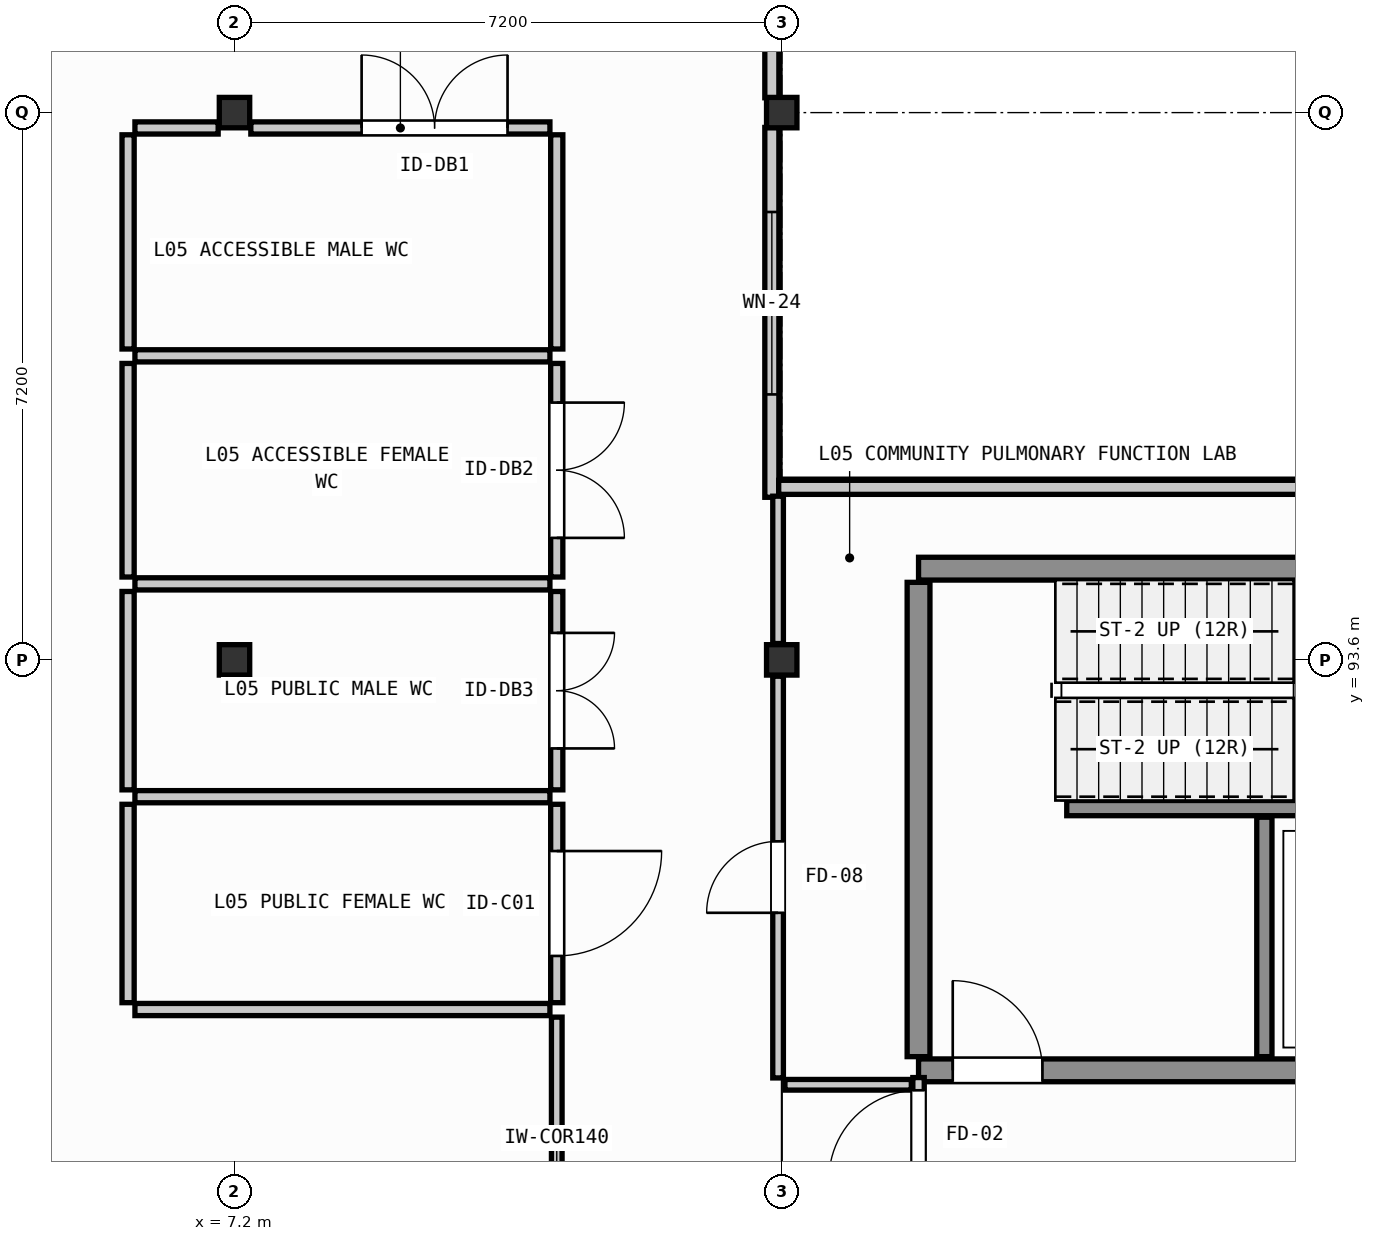
"""IFC4 building model, lengths in metres.
Left out: names, types, materials, properties, quantities, classifications, styles, units other than length and angle.
Written with IfcOpenShell. Run it as: python <this file> out.ifc"""

import sys

from ifc_helpers import new_model, si_unit, direction, frame, frame_2d, origin, origin_2d, place, context, subcontext, project, spatial, rectangle, extrude, element, fill, save


model = new_model("IFC4")
c1 = context("Model", 3, precision=1e-05, world=origin(), true_north=direction((0.0, 1.0)))
c2 = subcontext(c1, "Body", "Model", "MODEL_VIEW")
j1 = project(units=[si_unit("LENGTHUNIT", "METRE"), si_unit("PLANEANGLEUNIT", "RADIAN")], contexts=[c1])
p1 = place(None, origin())
s1 = spatial("IfcSite", under=j1, at=p1, CompositionType="ELEMENT")
p2 = place(p1, origin())
s2 = spatial("IfcBuilding", under=s1, at=p2, CompositionType="ELEMENT")
p3 = place(p2, frame((0.0, 0.0, 17.7)))
s3 = spatial("IfcBuildingStorey", under=s2, at=p3, CompositionType="ELEMENT", Elevation=17.7)
for number, where, z_axis, x_axis in (
    (1, (7.2, 93.6, 0.0), (0.0, 0.0, 1.0), (1.0, 0.0, 0.0)),
    (2, (7.2, 100.8, 0.0), (0.0, 0.0, 1.0), (1.0, 0.0, 0.0)),
    (3, (14.4, 93.6, 0.0), (0.0, 0.0, 1.0), (1.0, 0.0, 0.0)),
    (4, (14.4, 100.8, 0.0), (0.0, 0.0, 1.0), (1.0, 0.0, 0.0)),
):
    element("IfcColumn", number, at=place(p3, frame(where, z_axis=z_axis, x_axis=x_axis)), inside=s3, PredefinedType="COLUMN", context=c2, shape_type="SweptSolid", body=[
        extrude(rectangle(XDim=0.4, YDim=0.4, at=origin_2d()), origin(), (0.0, 0.0, 1.0), 3.69),
    ])
p4 = place(p3, frame((14.27, 105.861, 0.0), z_axis=(0.0, 0.0, 1.0), x_axis=(0.0, -1.0, 0.0)))
e5 = element("IfcWall", 5, at=p4, inside=s3, PredefinedType="SOLIDWALL", context=c2, shape_type="SweptSolid", body=[
    extrude(rectangle(XDim=4.866, YDim=0.185, at=frame_2d((2.433, 0.0))), origin(), (0.0, 0.0, 1.0), 3.05),
])
p5 = place(p4, frame((2.729, 0.0, 0.95)))
e6 = element("IfcOpeningElement", 6, at=p5, cuts=e5, PredefinedType="OPENING", context=c2, shape_type="SweptSolid", body=[
    extrude(rectangle(XDim=0.75, YDim=1.25, at=frame_2d((0.375, 0.625))), frame((0.0, 0.103, 0.0), z_axis=(0.0, -1.0, 0.0), x_axis=(1.0, 0.0, 0.0)), (0.0, 0.0, 1.0), 0.205),
])
p6 = place(p3, frame((14.27, 100.605, 0.0), z_axis=(0.0, 0.0, 1.0), x_axis=(0.0, -1.0, 0.0)))
e7 = element("IfcWall", 7, at=p6, inside=s3, PredefinedType="SOLIDWALL", context=c2, shape_type="SweptSolid", body=[
    extrude(rectangle(XDim=4.866, YDim=0.185, at=frame_2d((2.433, 0.0))), origin(), (0.0, 0.0, 1.0), 3.05),
])
p7 = place(p6, frame((1.113, 0.0, 1.5)))
e8 = element("IfcOpeningElement", 8, at=p7, cuts=e7, PredefinedType="OPENING", context=c2, shape_type="SweptSolid", body=[
    extrude(rectangle(XDim=2.4, YDim=0.95, at=frame_2d((1.2, 0.475))), frame((0.0, 0.103, 0.0), z_axis=(0.0, -1.0, 0.0), x_axis=(1.0, 0.0, 0.0)), (0.0, 0.0, 1.0), 0.205),
])
p8 = place(p3, frame((14.36, 95.87, 0.0), z_axis=(0.0, 0.0, 1.0), x_axis=(1.0, 0.0, 0.0)))
e9 = element("IfcWall", 9, at=p8, inside=s3, PredefinedType="SOLIDWALL", context=c2, shape_type="SweptSolid", body=[
    extrude(rectangle(XDim=7.24, YDim=0.185, at=frame_2d((3.62, 0.0))), origin(), (0.0, 0.0, 1.0), 3.13),
])
p9 = place(p3, frame((16.2, 88.2, 0.0), z_axis=(0.0, 0.0, 1.0), x_axis=(1.0, 0.0, 0.0)))
e10 = element("IfcWall", 10, at=p9, inside=s3, PredefinedType="SHEAR", context=c2, shape_type="SweptSolid", body=[
    extrude(rectangle(XDim=10.8, YDim=0.3, at=frame_2d((5.4, 0.0))), origin(), (0.0, 0.0, 1.0), 3.9),
])
p10 = place(p9, frame((0.45, 0.0, 0.0)))
e11 = element("IfcOpeningElement", 11, at=p10, cuts=e10, PredefinedType="OPENING", context=c2, shape_type="SweptSolid", body=[
    extrude(rectangle(XDim=1.18, YDim=2.16, at=frame_2d((0.59, 1.08))), frame((0.0, 0.16, 0.0), z_axis=(0.0, -1.0, 0.0), x_axis=(1.0, 0.0, 0.0)), (0.0, 0.0, 1.0), 0.32),
])
p11 = place(p9, frame((5.375, 0.0, 0.0)))
e12 = element("IfcOpeningElement", 12, at=p11, cuts=e10, PredefinedType="OPENING", context=c2, shape_type="SweptSolid", body=[
    extrude(rectangle(XDim=1.15, YDim=2.15, at=frame_2d((0.575, 1.075))), frame((0.0, 0.16, 0.0), z_axis=(0.0, -1.0, 0.0), x_axis=(1.0, 0.0, 0.0)), (0.0, 0.0, 1.0), 0.32),
])
p12 = place(p9, frame((8.34, 0.0, 0.0)))
e13 = element("IfcOpeningElement", 13, at=p12, cuts=e10, PredefinedType="OPENING", context=c2, shape_type="SweptSolid", body=[
    extrude(rectangle(XDim=1.02, YDim=2.12, at=frame_2d((0.51, 1.06))), frame((0.0, 0.16, 0.0), z_axis=(0.0, -1.0, 0.0), x_axis=(1.0, 0.0, 0.0)), (0.0, 0.0, 1.0), 0.32),
])
p13 = place(p3, frame((16.2, 94.8, 0.0), z_axis=(0.0, 0.0, 1.0), x_axis=(1.0, 0.0, 0.0)))
e14 = element("IfcWall", 14, at=p13, inside=s3, PredefinedType="SHEAR", context=c2, shape_type="SweptSolid", body=[
    extrude(rectangle(XDim=10.8, YDim=0.3, at=frame_2d((5.4, 0.0))), origin(), (0.0, 0.0, 1.0), 3.9),
])
p14 = place(p3, frame((16.2, 88.38, 0.0), z_axis=(0.0, 0.0, 1.0), x_axis=(0.0, 1.0, 0.0)))
e15 = element("IfcWall", 15, at=p14, inside=s3, PredefinedType="SHEAR", context=c2, shape_type="SweptSolid", body=[
    extrude(rectangle(XDim=6.24, YDim=0.3, at=frame_2d((3.12, 0.0))), origin(), (0.0, 0.0, 1.0), 3.9),
])
p15 = place(p3, frame((18.15, 91.65, 0.0), z_axis=(0.0, 0.0, 1.0), x_axis=(1.0, 0.0, 0.0)))
e16 = element("IfcWall", 16, at=p15, inside=s3, PredefinedType="SHEAR", context=c2, shape_type="SweptSolid", body=[
    extrude(rectangle(XDim=8.67, YDim=0.2, at=frame_2d((4.335, 0.0))), origin(), (0.0, 0.0, 1.0), 3.9),
])
p16 = place(p3, frame((20.75, 88.38, 0.0), z_axis=(0.0, 0.0, 1.0), x_axis=(0.0, 1.0, 0.0)))
e17 = element("IfcWall", 17, at=p16, inside=s3, PredefinedType="SHEAR", context=c2, shape_type="SweptSolid", body=[
    extrude(rectangle(XDim=3.15, YDim=0.2, at=frame_2d((1.575, 0.0))), origin(), (0.0, 0.0, 1.0), 3.9),
])
p17 = place(p3, frame((16.2, 85.69, 0.0), z_axis=(0.0, 0.0, 1.0), x_axis=(0.0, 1.0, 0.0)))
e18 = element("IfcWall", 18, at=p17, inside=s3, PredefinedType="PARTITIONING", context=c2, shape_type="SweptSolid", body=[
    extrude(rectangle(XDim=2.415, YDim=0.15, at=frame_2d((1.208, 0.0))), origin(), (0.0, 0.0, 1.0), 3.05),
])
p18 = place(p17, frame((1.067, 0.0, 0.0)))
e19 = element("IfcOpeningElement", 19, at=p18, cuts=e18, PredefinedType="OPENING", context=c2, shape_type="SweptSolid", body=[
    extrude(rectangle(XDim=1.18, YDim=2.16, at=frame_2d((0.59, 1.08))), frame((0.0, 0.085, 0.0), z_axis=(0.0, -1.0, 0.0), x_axis=(1.0, 0.0, 0.0)), (0.0, 0.0, 1.0), 0.17),
])
p19 = place(p3, frame((5.89, 100.598, 0.0), z_axis=(0.0, 0.0, 1.0), x_axis=(1.0, 0.0, 0.0)))
e20 = element("IfcWall", 20, at=p19, inside=s3, PredefinedType="PLUMBINGWALL", context=c2, shape_type="SweptSolid", body=[
    extrude(rectangle(XDim=1.095, YDim=0.16, at=frame_2d((0.548, 0.0))), origin(), (0.0, 0.0, 1.0), 3.05),
])
p20 = place(p3, frame((7.415, 100.598, 0.0), z_axis=(0.0, 0.0, 1.0), x_axis=(1.0, 0.0, 0.0)))
e21 = element("IfcWall", 21, at=p20, inside=s3, PredefinedType="PLUMBINGWALL", context=c2, shape_type="SweptSolid", body=[
    extrude(rectangle(XDim=3.935, YDim=0.16, at=frame_2d((1.968, 0.0))), origin(), (0.0, 0.0, 1.0), 3.05),
])
p21 = place(p20, frame((1.458, 0.0, 0.0)))
e22 = element("IfcOpeningElement", 22, at=p21, cuts=e21, PredefinedType="OPENING", context=c2, shape_type="SweptSolid", body=[
    extrude(rectangle(XDim=1.92, YDim=2.36, at=frame_2d((0.96, 1.18))), frame((0.0, 0.09, 0.0), z_axis=(0.0, -1.0, 0.0), x_axis=(1.0, 0.0, 0.0)), (0.0, 0.0, 1.0), 0.18),
])
p22 = place(p3, frame((11.44, 100.508, 0.0), z_axis=(0.0, 0.0, 1.0), x_axis=(0.0, -1.0, 0.0)))
e23 = element("IfcWall", 23, at=p22, inside=s3, PredefinedType="PLUMBINGWALL", context=c2, shape_type="SweptSolid", body=[
    extrude(rectangle(XDim=2.818, YDim=0.16, at=frame_2d((1.409, 0.0))), origin(), (0.0, 0.0, 1.0), 3.05),
])
p23 = place(p3, frame((11.35, 97.6, 0.0), z_axis=(0.0, 0.0, 1.0), x_axis=(-1.0, 0.0, 0.0)))
e24 = element("IfcWall", 24, at=p23, inside=s3, PredefinedType="PLUMBINGWALL", context=c2, shape_type="SweptSolid", body=[
    extrude(rectangle(XDim=5.46, YDim=0.16, at=frame_2d((2.73, 0.0))), origin(), (0.0, 0.0, 1.0), 3.13),
])
p24 = place(p3, frame((5.8, 97.69, 0.0), z_axis=(0.0, 0.0, 1.0), x_axis=(0.0, 1.0, 0.0)))
e25 = element("IfcWall", 25, at=p24, inside=s3, PredefinedType="PLUMBINGWALL", context=c2, shape_type="SweptSolid", body=[
    extrude(rectangle(XDim=2.818, YDim=0.16, at=frame_2d((1.409, 0.0))), origin(), (0.0, 0.0, 1.0), 3.05),
])
p25 = place(p3, frame((11.44, 97.5, 0.0), z_axis=(0.0, 0.0, 1.0), x_axis=(0.0, -1.0, 0.0)))
e26 = element("IfcWall", 26, at=p25, inside=s3, PredefinedType="PLUMBINGWALL", context=c2, shape_type="SweptSolid", body=[
    extrude(rectangle(XDim=2.81, YDim=0.16, at=frame_2d((1.405, 0.0))), origin(), (0.0, 0.0, 1.0), 3.67),
])
p26 = place(p25, frame((0.515, 0.0, 0.0)))
e27 = element("IfcOpeningElement", 27, at=p26, cuts=e26, PredefinedType="OPENING", context=c2, shape_type="SweptSolid", body=[
    extrude(rectangle(XDim=1.78, YDim=2.32, at=frame_2d((0.89, 1.16))), frame((0.0, 0.09, 0.0), z_axis=(0.0, -1.0, 0.0), x_axis=(1.0, 0.0, 0.0)), (0.0, 0.0, 1.0), 0.18),
])
p27 = place(p3, frame((11.35, 94.6, 0.0), z_axis=(0.0, 0.0, 1.0), x_axis=(-1.0, 0.0, 0.0)))
e28 = element("IfcWall", 28, at=p27, inside=s3, PredefinedType="PLUMBINGWALL", context=c2, shape_type="SweptSolid", body=[
    extrude(rectangle(XDim=5.46, YDim=0.16, at=frame_2d((2.73, 0.0))), origin(), (0.0, 0.0, 1.0), 3.13),
])
p28 = place(p3, frame((5.8, 94.69, 0.0), z_axis=(0.0, 0.0, 1.0), x_axis=(0.0, 1.0, 0.0)))
e29 = element("IfcWall", 29, at=p28, inside=s3, PredefinedType="PLUMBINGWALL", context=c2, shape_type="SweptSolid", body=[
    extrude(rectangle(XDim=2.81, YDim=0.16, at=frame_2d((1.405, 0.0))), origin(), (0.0, 0.0, 1.0), 3.67),
])
p29 = place(p3, frame((11.44, 94.5, 0.0), z_axis=(0.0, 0.0, 1.0), x_axis=(0.0, -1.0, 0.0)))
e30 = element("IfcWall", 30, at=p29, inside=s3, PredefinedType="PLUMBINGWALL", context=c2, shape_type="SweptSolid", body=[
    extrude(rectangle(XDim=2.61, YDim=0.16, at=frame_2d((1.305, 0.0))), origin(), (0.0, 0.0, 1.0), 3.05),
])
p30 = place(p29, frame((0.545, 0.0, 0.0)))
e31 = element("IfcOpeningElement", 31, at=p30, cuts=e30, PredefinedType="OPENING", context=c2, shape_type="SweptSolid", body=[
    extrude(rectangle(XDim=1.52, YDim=2.26, at=frame_2d((0.76, 1.13))), frame((0.0, 0.09, 0.0), z_axis=(0.0, -1.0, 0.0), x_axis=(1.0, 0.0, 0.0)), (0.0, 0.0, 1.0), 0.18),
])
p31 = place(p3, frame((11.35, 91.8, 0.0), z_axis=(0.0, 0.0, 1.0), x_axis=(-1.0, 0.0, 0.0)))
e32 = element("IfcWall", 32, at=p31, inside=s3, PredefinedType="PLUMBINGWALL", context=c2, shape_type="SweptSolid", body=[
    extrude(rectangle(XDim=5.46, YDim=0.16, at=frame_2d((2.73, 0.0))), origin(), (0.0, 0.0, 1.0), 3.13),
])
p32 = place(p3, frame((5.8, 91.89, 0.0), z_axis=(0.0, 0.0, 1.0), x_axis=(0.0, 1.0, 0.0)))
e33 = element("IfcWall", 33, at=p32, inside=s3, PredefinedType="PLUMBINGWALL", context=c2, shape_type="SweptSolid", body=[
    extrude(rectangle(XDim=2.61, YDim=0.16, at=frame_2d((1.305, 0.0))), origin(), (0.0, 0.0, 1.0), 3.05),
])
p33 = place(p3, frame((11.44, 91.7, 0.0), z_axis=(0.0, 0.0, 1.0), x_axis=(0.0, -1.0, 0.0)))
e34 = element("IfcWall", 34, at=p33, inside=s3, PredefinedType="PLUMBINGWALL", context=c2, shape_type="SweptSolid", body=[
    extrude(rectangle(XDim=2.61, YDim=0.16, at=frame_2d((1.305, 0.0))), origin(), (0.0, 0.0, 1.0), 3.67),
])
p34 = place(p33, frame((0.615, 0.0, 0.0)))
e35 = element("IfcOpeningElement", 35, at=p34, cuts=e34, PredefinedType="OPENING", context=c2, shape_type="SweptSolid", body=[
    extrude(rectangle(XDim=1.38, YDim=2.32, at=frame_2d((0.69, 1.16))), frame((0.0, 0.09, 0.0), z_axis=(0.0, -1.0, 0.0), x_axis=(1.0, 0.0, 0.0)), (0.0, 0.0, 1.0), 0.18),
])
p35 = place(p3, frame((11.35, 89.0, 0.0), z_axis=(0.0, 0.0, 1.0), x_axis=(-1.0, 0.0, 0.0)))
e36 = element("IfcWall", 36, at=p35, inside=s3, PredefinedType="PLUMBINGWALL", context=c2, shape_type="SweptSolid", body=[
    extrude(rectangle(XDim=5.46, YDim=0.16, at=frame_2d((2.73, 0.0))), origin(), (0.0, 0.0, 1.0), 3.13),
])
p36 = place(p3, frame((5.8, 89.09, 0.0), z_axis=(0.0, 0.0, 1.0), x_axis=(0.0, 1.0, 0.0)))
e37 = element("IfcWall", 37, at=p36, inside=s3, PredefinedType="PLUMBINGWALL", context=c2, shape_type="SweptSolid", body=[
    extrude(rectangle(XDim=2.61, YDim=0.16, at=frame_2d((1.305, 0.0))), origin(), (0.0, 0.0, 1.0), 3.67),
])
p37 = place(p3, frame((11.44, 88.9, 0.0), z_axis=(0.0, 0.0, 1.0), x_axis=(0.0, -1.0, 0.0)))
e38 = element("IfcWall", 38, at=p37, inside=s3, PredefinedType="PARTITIONING", context=c2, shape_type="SweptSolid", body=[
    extrude(rectangle(XDim=5.867, YDim=0.14, at=frame_2d((2.934, 0.0))), origin(), (0.0, 0.0, 1.0), 3.05),
])
p38 = place(p37, frame((2.154, 0.0, 0.0)))
e39 = element("IfcOpeningElement", 39, at=p38, cuts=e38, PredefinedType="OPENING", context=c2, shape_type="SweptSolid", body=[
    extrude(rectangle(XDim=1.56, YDim=2.22, at=frame_2d((0.78, 1.11))), frame((0.0, 0.08, 0.0), z_axis=(0.0, -1.0, 0.0), x_axis=(1.0, 0.0, 0.0)), (0.0, 0.0, 1.0), 0.16),
])
p39 = place(p3, frame((14.352, 88.1, 0.0), z_axis=(0.0, 0.0, 1.0), x_axis=(0.0, 1.0, 0.0)))
e40 = element("IfcWall", 40, at=p39, inside=s3, PredefinedType="PARTITIONING", context=c2, shape_type="SweptSolid", body=[
    extrude(rectangle(XDim=5.285, YDim=0.14, at=frame_2d((2.643, 0.0))), origin(), (0.0, 0.0, 1.0), 3.05),
])
p40 = place(p39, frame((2.173, 0.0, 0.0)))
e41 = element("IfcOpeningElement", 41, at=p40, cuts=e40, PredefinedType="OPENING", context=c2, shape_type="SweptSolid", body=[
    extrude(rectangle(XDim=0.94, YDim=2.1, at=frame_2d((0.47, 1.05))), frame((0.0, 0.08, 0.0), z_axis=(0.0, -1.0, 0.0), x_axis=(1.0, 0.0, 0.0)), (0.0, 0.0, 1.0), 0.16),
])
p41 = place(p3, frame((14.352, 93.815, 0.0), z_axis=(0.0, 0.0, 1.0), x_axis=(0.0, 1.0, 0.0)))
e42 = element("IfcWall", 42, at=p41, inside=s3, PredefinedType="PARTITIONING", context=c2, shape_type="SweptSolid", body=[
    extrude(rectangle(XDim=1.939, YDim=0.14, at=frame_2d((0.969, 0.0))), origin(), (0.0, 0.0, 1.0), 3.05),
])
p42 = place(p3, frame((16.105, 88.01, 0.0), z_axis=(0.0, 0.0, 1.0), x_axis=(-1.0, 0.0, 0.0)))
e43 = element("IfcWall", 43, at=p42, inside=s3, PredefinedType="PARTITIONING", context=c2, shape_type="SweptSolid", body=[
    extrude(rectangle(XDim=1.663, YDim=0.14, at=frame_2d((0.832, 0.0))), origin(), (0.0, 0.0, 1.0), 3.13),
])
p43 = place(p7, origin())
e44 = element("IfcWindow", 44, at=p43, inside=s3, PartitioningType="SINGLE_PANEL", PredefinedType="WINDOW", context=c2, shape_type="SweptSolid", body=[
    extrude(rectangle(XDim=2.4, YDim=0.95, at=frame_2d((1.2, 0.475))), frame((0.0, 0.03, 0.0), z_axis=(0.0, -1.0, 0.0), x_axis=(1.0, 0.0, 0.0)), (0.0, 0.0, 1.0), 0.06),
])
fill(e8, e44)
p44 = place(p10, origin())
e45 = element("IfcDoor", 45, at=p44, inside=s3, OperationType="SINGLE_SWING_LEFT", PredefinedType="DOOR", context=c2, shape_type="SweptSolid", body=[
    extrude(rectangle(XDim=1.18, YDim=2.16, at=frame_2d((0.59, 1.08))), frame((0.0, 0.025, 0.0), z_axis=(0.0, -1.0, 0.0), x_axis=(1.0, 0.0, 0.0)), (0.0, 0.0, 1.0), 0.05),
])
fill(e11, e45)
p45 = place(p18, origin())
e46 = element("IfcDoor", 46, at=p45, inside=s3, OperationType="SINGLE_SWING_RIGHT", PredefinedType="DOOR", context=c2, shape_type="SweptSolid", body=[
    extrude(rectangle(XDim=1.18, YDim=2.16, at=frame_2d((0.59, 1.08))), frame((0.0, 0.025, 0.0), z_axis=(0.0, -1.0, 0.0), x_axis=(1.0, 0.0, 0.0)), (0.0, 0.0, 1.0), 0.05),
])
fill(e19, e46)
p46 = place(p21, origin())
e47 = element("IfcDoor", 47, at=p46, inside=s3, OperationType="DOUBLE_DOOR_SINGLE_SWING", PredefinedType="DOOR", context=c2, shape_type="SweptSolid", body=[
    extrude(rectangle(XDim=1.92, YDim=2.36, at=frame_2d((0.96, 1.18))), frame((0.0, 0.025, 0.0), z_axis=(0.0, -1.0, 0.0), x_axis=(1.0, 0.0, 0.0)), (0.0, 0.0, 1.0), 0.05),
])
fill(e22, e47)
p47 = place(p26, origin())
e48 = element("IfcDoor", 48, at=p47, inside=s3, OperationType="DOUBLE_DOOR_SINGLE_SWING", PredefinedType="DOOR", context=c2, shape_type="SweptSolid", body=[
    extrude(rectangle(XDim=1.78, YDim=2.32, at=frame_2d((0.89, 1.16))), frame((0.0, 0.025, 0.0), z_axis=(0.0, -1.0, 0.0), x_axis=(1.0, 0.0, 0.0)), (0.0, 0.0, 1.0), 0.05),
])
fill(e27, e48)
p48 = place(p30, origin())
e49 = element("IfcDoor", 49, at=p48, inside=s3, OperationType="DOUBLE_DOOR_SINGLE_SWING", PredefinedType="DOOR", context=c2, shape_type="SweptSolid", body=[
    extrude(rectangle(XDim=1.52, YDim=2.26, at=frame_2d((0.76, 1.13))), frame((0.0, 0.025, 0.0), z_axis=(0.0, -1.0, 0.0), x_axis=(1.0, 0.0, 0.0)), (0.0, 0.0, 1.0), 0.05),
])
fill(e31, e49)
p49 = place(p34, origin())
e50 = element("IfcDoor", 50, at=p49, inside=s3, OperationType="SINGLE_SWING_LEFT", PredefinedType="DOOR", context=c2, shape_type="SweptSolid", body=[
    extrude(rectangle(XDim=1.38, YDim=2.32, at=frame_2d((0.69, 1.16))), frame((0.0, 0.025, 0.0), z_axis=(0.0, -1.0, 0.0), x_axis=(1.0, 0.0, 0.0)), (0.0, 0.0, 1.0), 0.05),
])
fill(e35, e50)
p50 = place(p40, origin())
e51 = element("IfcDoor", 51, at=p50, inside=s3, OperationType="SINGLE_SWING_RIGHT", PredefinedType="DOOR", context=c2, shape_type="SweptSolid", body=[
    extrude(rectangle(XDim=0.94, YDim=2.1, at=frame_2d((0.47, 1.05))), frame((0.0, 0.025, 0.0), z_axis=(0.0, -1.0, 0.0), x_axis=(1.0, 0.0, 0.0)), (0.0, 0.0, 1.0), 0.05),
])
fill(e41, e51)
save(model, sys.argv[1])
